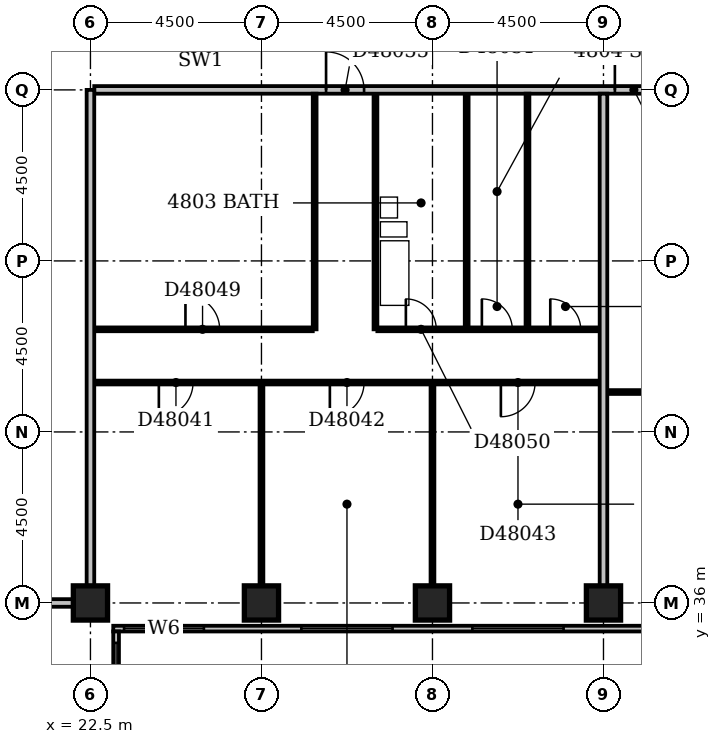
"""IFC4 building model, lengths in metres.
Left out: names, types, materials, properties, quantities, classifications, styles, units other than length and angle.
Written with IfcOpenShell. Run it as: python <this file> out.ifc"""

import sys

from ifc_helpers import new_model, si_unit, direction, frame, frame_2d, origin, origin_2d, place, context, subcontext, project, spatial, rectangle, extrude, element, fill, save


model = new_model("IFC4")
c1 = context("Model", 3, precision=1e-05, world=origin(), true_north=direction((0.0, 1.0)))
c2 = subcontext(c1, "Body", "Model", "MODEL_VIEW")
j1 = project(units=[si_unit("LENGTHUNIT", "METRE"), si_unit("PLANEANGLEUNIT", "RADIAN")], contexts=[c1])
p1 = place(None, origin())
s1 = spatial("IfcSite", under=j1, at=p1, CompositionType="ELEMENT")
p2 = place(p1, origin())
s2 = spatial("IfcBuilding", under=s1, at=p2, CompositionType="ELEMENT")
p3 = place(p2, frame((0.0, 0.0, 189.8)))
s3 = spatial("IfcBuildingStorey", under=s2, at=p3, CompositionType="ELEMENT", Elevation=189.8)
for number, where, z_axis, x_axis in (
    (1, (22.5, 36.0, -0.3), (0.0, 0.0, 1.0), (1.0, 0.0, 0.0)),
    (2, (27.0, 36.0, -0.3), (0.0, 0.0, 1.0), (1.0, 0.0, 0.0)),
    (3, (31.5, 36.0, -0.3), (0.0, 0.0, 1.0), (1.0, 0.0, 0.0)),
    (4, (36.0, 36.0, -0.3), (0.0, 0.0, 1.0), (1.0, 0.0, 0.0)),
):
    element("IfcColumn", number, at=place(p3, frame(where, z_axis=z_axis, x_axis=x_axis)), inside=s3, PredefinedType="COLUMN", context=c2, shape_type="SweptSolid", body=[
        extrude(rectangle(XDim=0.9, YDim=0.9, at=origin_2d()), origin(), (0.0, 0.0, 1.0), 3.6),
    ])
p4 = place(p3, frame((23.175, 17.4, 0.0), z_axis=(0.0, 0.0, 1.0), x_axis=(0.0, 1.0, 0.0)))
e5 = element("IfcWall", 5, at=p4, inside=s3, PredefinedType="STANDARD", context=c2, shape_type="SweptSolid", body=[
    extrude(rectangle(XDim=17.85, YDim=0.15, at=frame_2d((8.925, 0.0))), origin(), (0.0, 0.0, 1.0), 2.7),
])
p5 = place(p4, frame((1.35, 0.0, 0.6)))
e6 = element("IfcOpeningElement", 6, at=p5, cuts=e5, PredefinedType="OPENING", context=c2, shape_type="SweptSolid", body=[
    extrude(rectangle(XDim=2.1, YDim=1.8, at=frame_2d((1.05, 0.9))), frame((0.0, 0.087, 0.0), z_axis=(0.0, -1.0, 0.0), x_axis=(1.0, 0.0, 0.0)), (0.0, 0.0, 1.0), 0.174),
])
p6 = place(p4, frame((6.15, 0.0, 0.6)))
e7 = element("IfcOpeningElement", 7, at=p6, cuts=e5, PredefinedType="OPENING", context=c2, shape_type="SweptSolid", body=[
    extrude(rectangle(XDim=2.4, YDim=1.8, at=frame_2d((1.2, 0.9))), frame((0.0, 0.087, 0.0), z_axis=(0.0, -1.0, 0.0), x_axis=(1.0, 0.0, 0.0)), (0.0, 0.0, 1.0), 0.174),
])
p7 = place(p4, frame((10.65, 0.0, 0.6)))
e8 = element("IfcOpeningElement", 8, at=p7, cuts=e5, PredefinedType="OPENING", context=c2, shape_type="SweptSolid", body=[
    extrude(rectangle(XDim=2.4, YDim=1.8, at=frame_2d((1.2, 0.9))), frame((0.0, 0.087, 0.0), z_axis=(0.0, -1.0, 0.0), x_axis=(1.0, 0.0, 0.0)), (0.0, 0.0, 1.0), 0.174),
])
p8 = place(p4, frame((15.15, 0.0, 0.6)))
e9 = element("IfcOpeningElement", 9, at=p8, cuts=e5, PredefinedType="OPENING", context=c2, shape_type="SweptSolid", body=[
    extrude(rectangle(XDim=2.4, YDim=1.8, at=frame_2d((1.2, 0.9))), frame((0.0, 0.087, 0.0), z_axis=(0.0, -1.0, 0.0), x_axis=(1.0, 0.0, 0.0)), (0.0, 0.0, 1.0), 0.174),
])
p9 = place(p3, frame((23.1, 35.325, 0.0), z_axis=(0.0, 0.0, 1.0), x_axis=(1.0, 0.0, 0.0)))
e10 = element("IfcWall", 10, at=p9, inside=s3, PredefinedType="STANDARD", context=c2, shape_type="SweptSolid", body=[
    extrude(rectangle(XDim=27.15, YDim=0.15, at=frame_2d((13.575, 0.0))), origin(), (0.0, 0.0, 1.0), 2.7),
])
p10 = place(p9, frame((0.285, 0.0, 0.6)))
e11 = element("IfcOpeningElement", 11, at=p10, cuts=e10, PredefinedType="OPENING", context=c2, shape_type="SweptSolid", body=[
    extrude(rectangle(XDim=2.1, YDim=1.8, at=frame_2d((1.05, 0.9))), frame((0.0, 0.087, 0.0), z_axis=(0.0, -1.0, 0.0), x_axis=(1.0, 0.0, 0.0)), (0.0, 0.0, 1.0), 0.174),
])
p11 = place(p9, frame((4.95, 0.0, 0.6)))
e12 = element("IfcOpeningElement", 12, at=p11, cuts=e10, PredefinedType="OPENING", context=c2, shape_type="SweptSolid", body=[
    extrude(rectangle(XDim=2.4, YDim=1.8, at=frame_2d((1.2, 0.9))), frame((0.0, 0.087, 0.0), z_axis=(0.0, -1.0, 0.0), x_axis=(1.0, 0.0, 0.0)), (0.0, 0.0, 1.0), 0.174),
])
p12 = place(p9, frame((9.45, 0.0, 0.6)))
e13 = element("IfcOpeningElement", 13, at=p12, cuts=e10, PredefinedType="OPENING", context=c2, shape_type="SweptSolid", body=[
    extrude(rectangle(XDim=2.4, YDim=1.8, at=frame_2d((1.2, 0.9))), frame((0.0, 0.087, 0.0), z_axis=(0.0, -1.0, 0.0), x_axis=(1.0, 0.0, 0.0)), (0.0, 0.0, 1.0), 0.174),
])
p13 = place(p9, frame((13.95, 0.0, 0.6)))
e14 = element("IfcOpeningElement", 14, at=p13, cuts=e10, PredefinedType="OPENING", context=c2, shape_type="SweptSolid", body=[
    extrude(rectangle(XDim=2.4, YDim=1.8, at=frame_2d((1.2, 0.9))), frame((0.0, 0.087, 0.0), z_axis=(0.0, -1.0, 0.0), x_axis=(1.0, 0.0, 0.0)), (0.0, 0.0, 1.0), 0.174),
])
p14 = place(p9, frame((18.45, 0.0, 0.6)))
e15 = element("IfcOpeningElement", 15, at=p14, cuts=e10, PredefinedType="OPENING", context=c2, shape_type="SweptSolid", body=[
    extrude(rectangle(XDim=2.4, YDim=1.8, at=frame_2d((1.2, 0.9))), frame((0.0, 0.087, 0.0), z_axis=(0.0, -1.0, 0.0), x_axis=(1.0, 0.0, 0.0)), (0.0, 0.0, 1.0), 0.174),
])
p15 = place(p9, frame((24.179, 0.0, 0.6)))
e16 = element("IfcOpeningElement", 16, at=p15, cuts=e10, PredefinedType="OPENING", context=c2, shape_type="SweptSolid", body=[
    extrude(rectangle(XDim=1.5, YDim=1.8, at=frame_2d((0.75, 0.9))), frame((0.0, 0.087, 0.0), z_axis=(0.0, -1.0, 0.0), x_axis=(1.0, 0.0, 0.0)), (0.0, 0.0, 1.0), 0.174),
])
p16 = place(p3, frame((9.1, 36.0, 0.0), z_axis=(0.0, 0.0, 1.0), x_axis=(1.0, 0.0, 0.0)))
e17 = element("IfcWall", 17, at=p16, inside=s3, PredefinedType="PARTITIONING", context=c2, shape_type="SweptSolid", body=[
    extrude(rectangle(XDim=12.95, YDim=0.2, at=frame_2d((6.475, 0.0))), origin(), (0.0, 0.0, 1.0), 3.3),
])
p17 = place(p3, frame((22.5, 36.45, 0.0), z_axis=(0.0, 0.0, 1.0), x_axis=(0.0, 1.0, 0.0)))
e18 = element("IfcWall", 18, at=p17, inside=s3, PredefinedType="PARTITIONING", context=c2, shape_type="SweptSolid", body=[
    extrude(rectangle(XDim=13.05, YDim=0.2, at=frame_2d((6.525, 0.0))), origin(), (0.0, 0.0, 1.0), 3.3),
])
p18 = place(p3, frame((27.0, 36.45, 0.0), z_axis=(0.0, 0.0, 1.0), x_axis=(0.0, 1.0, 0.0)))
e19 = element("IfcWall", 19, at=p18, inside=s3, PredefinedType="PARTITIONING", context=c2, shape_type="SweptSolid", body=[
    extrude(rectangle(XDim=5.3, YDim=0.1, at=frame_2d((2.65, 0.0))), origin(), (0.0, 0.0, 1.0), 2.4),
])
p19 = place(p3, frame((31.5, 36.45, 0.0), z_axis=(0.0, 0.0, 1.0), x_axis=(0.0, 1.0, 0.0)))
e20 = element("IfcWall", 20, at=p19, inside=s3, PredefinedType="PARTITIONING", context=c2, shape_type="SweptSolid", body=[
    extrude(rectangle(XDim=5.3, YDim=0.1, at=frame_2d((2.65, 0.0))), origin(), (0.0, 0.0, 1.0), 3.3),
])
p20 = place(p3, frame((36.0, 36.45, 0.0), z_axis=(0.0, 0.0, 1.0), x_axis=(0.0, 1.0, 0.0)))
e21 = element("IfcWall", 21, at=p20, inside=s3, PredefinedType="PARTITIONING", context=c2, shape_type="SweptSolid", body=[
    extrude(rectangle(XDim=12.95, YDim=0.2, at=frame_2d((6.475, 0.0))), origin(), (0.0, 0.0, 1.0), 2.4),
])
p21 = place(p3, frame((36.1, 41.55, 0.0), z_axis=(0.0, 0.0, 1.0), x_axis=(1.0, 0.0, 0.0)))
e22 = element("IfcWall", 22, at=p21, inside=s3, PredefinedType="PARTITIONING", context=c2, shape_type="SweptSolid", body=[
    extrude(rectangle(XDim=13.3, YDim=0.1, at=frame_2d((6.65, 0.0))), origin(), (0.0, 0.0, 1.0), 3.3),
])
p22 = place(p21, frame((3.9, 0.0, 0.0)))
e23 = element("IfcOpeningElement", 23, at=p22, cuts=e22, PredefinedType="OPENING", context=c2, shape_type="SweptSolid", body=[
    extrude(rectangle(XDim=0.9, YDim=2.1, at=frame_2d((0.45, 1.05))), frame((0.0, 0.062, 0.0), z_axis=(0.0, -1.0, 0.0), x_axis=(1.0, 0.0, 0.0)), (0.0, 0.0, 1.0), 0.124),
])
p23 = place(p21, frame((10.7, 0.0, 0.0)))
e24 = element("IfcOpeningElement", 24, at=p23, cuts=e22, PredefinedType="OPENING", context=c2, shape_type="SweptSolid", body=[
    extrude(rectangle(XDim=0.9, YDim=2.1, at=frame_2d((0.45, 1.05))), frame((0.0, 0.062, 0.0), z_axis=(0.0, -1.0, 0.0), x_axis=(1.0, 0.0, 0.0)), (0.0, 0.0, 1.0), 0.124),
])
p24 = place(p3, frame((22.6, 41.8, 0.0), z_axis=(0.0, 0.0, 1.0), x_axis=(1.0, 0.0, 0.0)))
e25 = element("IfcWall", 25, at=p24, inside=s3, PredefinedType="PARTITIONING", context=c2, shape_type="SweptSolid", body=[
    extrude(rectangle(XDim=13.3, YDim=0.1, at=frame_2d((6.65, 0.0))), origin(), (0.0, 0.0, 1.0), 3.3),
])
p25 = place(p24, frame((1.7, 0.0, 0.0)))
e26 = element("IfcOpeningElement", 26, at=p25, cuts=e25, PredefinedType="OPENING", context=c2, shape_type="SweptSolid", body=[
    extrude(rectangle(XDim=0.9, YDim=2.1, at=frame_2d((0.45, 1.05))), frame((0.0, 0.062, 0.0), z_axis=(0.0, -1.0, 0.0), x_axis=(1.0, 0.0, 0.0)), (0.0, 0.0, 1.0), 0.124),
])
p26 = place(p24, frame((6.2, 0.0, 0.0)))
e27 = element("IfcOpeningElement", 27, at=p26, cuts=e25, PredefinedType="OPENING", context=c2, shape_type="SweptSolid", body=[
    extrude(rectangle(XDim=0.9, YDim=2.1, at=frame_2d((0.45, 1.05))), frame((0.0, 0.062, 0.0), z_axis=(0.0, -1.0, 0.0), x_axis=(1.0, 0.0, 0.0)), (0.0, 0.0, 1.0), 0.124),
])
p27 = place(p24, frame((10.7, 0.0, 0.0)))
e28 = element("IfcOpeningElement", 28, at=p27, cuts=e25, PredefinedType="OPENING", context=c2, shape_type="SweptSolid", body=[
    extrude(rectangle(XDim=0.9, YDim=2.1, at=frame_2d((0.45, 1.05))), frame((0.0, 0.062, 0.0), z_axis=(0.0, -1.0, 0.0), x_axis=(1.0, 0.0, 0.0)), (0.0, 0.0, 1.0), 0.124),
])
p28 = place(p3, frame((22.6, 43.2, 0.0), z_axis=(0.0, 0.0, 1.0), x_axis=(1.0, 0.0, 0.0)))
e29 = element("IfcWall", 29, at=p28, inside=s3, PredefinedType="PARTITIONING", context=c2, shape_type="SweptSolid", body=[
    extrude(rectangle(XDim=5.75, YDim=0.1, at=frame_2d((2.875, 0.0))), origin(), (0.0, 0.0, 1.0), 3.3),
])
p29 = place(p28, frame((2.4, 0.0, 0.0)))
e30 = element("IfcOpeningElement", 30, at=p29, cuts=e29, PredefinedType="OPENING", context=c2, shape_type="SweptSolid", body=[
    extrude(rectangle(XDim=0.9, YDim=2.1, at=frame_2d((0.45, 1.05))), frame((0.0, 0.062, 0.0), z_axis=(0.0, -1.0, 0.0), x_axis=(1.0, 0.0, 0.0)), (0.0, 0.0, 1.0), 0.124),
])
p30 = place(p3, frame((28.4, 43.2, 0.0), z_axis=(0.0, 0.0, 1.0), x_axis=(0.0, 1.0, 0.0)))
e31 = element("IfcWall", 31, at=p30, inside=s3, PredefinedType="PARTITIONING", context=c2, shape_type="SweptSolid", body=[
    extrude(rectangle(XDim=6.2, YDim=0.1, at=frame_2d((3.1, 0.0))), origin(), (0.0, 0.0, 1.0), 3.3),
])
p31 = place(p3, frame((30.0, 43.2, 0.0), z_axis=(0.0, 0.0, 1.0), x_axis=(0.0, 1.0, 0.0)))
e32 = element("IfcWall", 32, at=p31, inside=s3, PredefinedType="PLUMBINGWALL", context=c2, shape_type="SweptSolid", body=[
    extrude(rectangle(XDim=6.2, YDim=0.1, at=frame_2d((3.1, 0.0))), origin(), (0.0, 0.0, 1.0), 3.3),
])
p32 = place(p3, frame((30.05, 43.2, 0.0), z_axis=(0.0, 0.0, 1.0), x_axis=(1.0, 0.0, 0.0)))
e33 = element("IfcWall", 33, at=p32, inside=s3, PredefinedType="PARTITIONING", context=c2, shape_type="SweptSolid", body=[
    extrude(rectangle(XDim=5.85, YDim=0.1, at=frame_2d((2.925, 0.0))), origin(), (0.0, 0.0, 1.0), 3.3),
])
p33 = place(p32, frame((0.75, 0.0, 0.0)))
e34 = element("IfcOpeningElement", 34, at=p33, cuts=e33, PredefinedType="OPENING", context=c2, shape_type="SweptSolid", body=[
    extrude(rectangle(XDim=0.8, YDim=2.1, at=frame_2d((0.4, 1.05))), frame((0.0, 0.062, 0.0), z_axis=(0.0, -1.0, 0.0), x_axis=(1.0, 0.0, 0.0)), (0.0, 0.0, 1.0), 0.124),
])
p34 = place(p32, frame((2.75, 0.0, 0.0)))
e35 = element("IfcOpeningElement", 35, at=p34, cuts=e33, PredefinedType="OPENING", context=c2, shape_type="SweptSolid", body=[
    extrude(rectangle(XDim=0.8, YDim=2.1, at=frame_2d((0.4, 1.05))), frame((0.0, 0.062, 0.0), z_axis=(0.0, -1.0, 0.0), x_axis=(1.0, 0.0, 0.0)), (0.0, 0.0, 1.0), 0.124),
])
p35 = place(p32, frame((4.55, 0.0, 0.0)))
e36 = element("IfcOpeningElement", 36, at=p35, cuts=e33, PredefinedType="OPENING", context=c2, shape_type="SweptSolid", body=[
    extrude(rectangle(XDim=0.8, YDim=2.1, at=frame_2d((0.4, 1.05))), frame((0.0, 0.062, 0.0), z_axis=(0.0, -1.0, 0.0), x_axis=(1.0, 0.0, 0.0)), (0.0, 0.0, 1.0), 0.124),
])
p36 = place(p3, frame((32.4, 43.25, 0.0), z_axis=(0.0, 0.0, 1.0), x_axis=(0.0, 1.0, 0.0)))
e37 = element("IfcWall", 37, at=p36, inside=s3, PredefinedType="PLUMBINGWALL", context=c2, shape_type="SweptSolid", body=[
    extrude(rectangle(XDim=6.15, YDim=0.1, at=frame_2d((3.075, 0.0))), origin(), (0.0, 0.0, 1.0), 3.3),
])
p37 = place(p3, frame((34.0, 43.25, 0.0), z_axis=(0.0, 0.0, 1.0), x_axis=(0.0, 1.0, 0.0)))
e38 = element("IfcWall", 38, at=p37, inside=s3, PredefinedType="PARTITIONING", context=c2, shape_type="SweptSolid", body=[
    extrude(rectangle(XDim=6.15, YDim=0.1, at=frame_2d((3.075, 0.0))), origin(), (0.0, 0.0, 1.0), 3.3),
])
p38 = place(p3, frame((22.6, 49.5, 0.0), z_axis=(0.0, 0.0, 1.0), x_axis=(1.0, 0.0, 0.0)))
e39 = element("IfcWall", 39, at=p38, inside=s3, PredefinedType="PARTITIONING", context=c2, shape_type="SweptSolid", body=[
    extrude(rectangle(XDim=30.95, YDim=0.2, at=frame_2d((15.475, 0.0))), origin(), (0.0, 0.0, 1.0), 3.3),
])
p39 = place(p38, frame((6.1, 0.0, 0.0)))
e40 = element("IfcOpeningElement", 40, at=p39, cuts=e39, PredefinedType="OPENING", context=c2, shape_type="SweptSolid", body=[
    extrude(rectangle(XDim=1.0, YDim=2.1, at=frame_2d((0.5, 1.05))), frame((0.0, 0.112, 0.0), z_axis=(0.0, -1.0, 0.0), x_axis=(1.0, 0.0, 0.0)), (0.0, 0.0, 1.0), 0.224),
])
p40 = place(p38, frame((13.7, 0.0, 0.0)))
e41 = element("IfcOpeningElement", 41, at=p40, cuts=e39, PredefinedType="OPENING", context=c2, shape_type="SweptSolid", body=[
    extrude(rectangle(XDim=1.0, YDim=2.1, at=frame_2d((0.5, 1.05))), frame((0.0, 0.112, 0.0), z_axis=(0.0, -1.0, 0.0), x_axis=(1.0, 0.0, 0.0)), (0.0, 0.0, 1.0), 0.224),
])
p41 = place(p38, frame((27.15, 0.0, 0.0)))
e42 = element("IfcOpeningElement", 42, at=p41, cuts=e39, PredefinedType="OPENING", context=c2, shape_type="SweptSolid", body=[
    extrude(rectangle(XDim=1.0, YDim=2.1, at=frame_2d((0.5, 1.05))), frame((0.0, 0.112, 0.0), z_axis=(0.0, -1.0, 0.0), x_axis=(1.0, 0.0, 0.0)), (0.0, 0.0, 1.0), 0.224),
])
p42 = place(p8, origin())
e43 = element("IfcWindow", 43, at=p42, inside=s3, PartitioningType="SINGLE_PANEL", PredefinedType="WINDOW", context=c2, shape_type="SweptSolid", body=[
    extrude(rectangle(XDim=2.4, YDim=1.8, at=frame_2d((1.2, 0.9))), frame((0.0, 0.03, 0.0), z_axis=(0.0, -1.0, 0.0), x_axis=(1.0, 0.0, 0.0)), (0.0, 0.0, 1.0), 0.06),
])
fill(e9, e43)
p43 = place(p10, origin())
e44 = element("IfcWindow", 44, at=p43, inside=s3, PartitioningType="SINGLE_PANEL", PredefinedType="WINDOW", context=c2, shape_type="SweptSolid", body=[
    extrude(rectangle(XDim=2.1, YDim=1.8, at=frame_2d((1.05, 0.9))), frame((0.0, 0.03, 0.0), z_axis=(0.0, -1.0, 0.0), x_axis=(1.0, 0.0, 0.0)), (0.0, 0.0, 1.0), 0.06),
])
fill(e11, e44)
p44 = place(p11, origin())
e45 = element("IfcWindow", 45, at=p44, inside=s3, PartitioningType="SINGLE_PANEL", PredefinedType="WINDOW", context=c2, shape_type="SweptSolid", body=[
    extrude(rectangle(XDim=2.4, YDim=1.8, at=frame_2d((1.2, 0.9))), frame((0.0, 0.03, 0.0), z_axis=(0.0, -1.0, 0.0), x_axis=(1.0, 0.0, 0.0)), (0.0, 0.0, 1.0), 0.06),
])
fill(e12, e45)
p45 = place(p12, origin())
e46 = element("IfcWindow", 46, at=p45, inside=s3, PartitioningType="SINGLE_PANEL", PredefinedType="WINDOW", context=c2, shape_type="SweptSolid", body=[
    extrude(rectangle(XDim=2.4, YDim=1.8, at=frame_2d((1.2, 0.9))), frame((0.0, 0.03, 0.0), z_axis=(0.0, -1.0, 0.0), x_axis=(1.0, 0.0, 0.0)), (0.0, 0.0, 1.0), 0.06),
])
fill(e13, e46)
p46 = place(p25, frame((0.9, 0.0, 0.0), z_axis=(0.0, 0.0, 1.0), x_axis=(-1.0, 0.0, 0.0)))
e47 = element("IfcDoor", 47, at=p46, inside=s3, OperationType="SINGLE_SWING_RIGHT", PredefinedType="DOOR", context=c2, shape_type="SweptSolid", body=[
    extrude(rectangle(XDim=0.9, YDim=2.1, at=frame_2d((0.45, 1.05))), frame((0.0, 0.025, 0.0), z_axis=(0.0, -1.0, 0.0), x_axis=(1.0, 0.0, 0.0)), (0.0, 0.0, 1.0), 0.05),
])
fill(e26, e47)
p47 = place(p26, frame((0.9, 0.0, 0.0), z_axis=(0.0, 0.0, 1.0), x_axis=(-1.0, 0.0, 0.0)))
e48 = element("IfcDoor", 48, at=p47, inside=s3, OperationType="SINGLE_SWING_RIGHT", PredefinedType="DOOR", context=c2, shape_type="SweptSolid", body=[
    extrude(rectangle(XDim=0.9, YDim=2.1, at=frame_2d((0.45, 1.05))), frame((0.0, 0.025, 0.0), z_axis=(0.0, -1.0, 0.0), x_axis=(1.0, 0.0, 0.0)), (0.0, 0.0, 1.0), 0.05),
])
fill(e27, e48)
p48 = place(p27, frame((0.9, 0.0, 0.0), z_axis=(0.0, 0.0, 1.0), x_axis=(-1.0, 0.0, 0.0)))
e49 = element("IfcDoor", 49, at=p48, inside=s3, OperationType="SINGLE_SWING_RIGHT", PredefinedType="DOOR", context=c2, shape_type="SweptSolid", body=[
    extrude(rectangle(XDim=0.9, YDim=2.1, at=frame_2d((0.45, 1.05))), frame((0.0, 0.025, 0.0), z_axis=(0.0, -1.0, 0.0), x_axis=(1.0, 0.0, 0.0)), (0.0, 0.0, 1.0), 0.05),
])
fill(e28, e49)
p49 = place(p29, origin())
e50 = element("IfcDoor", 50, at=p49, inside=s3, OperationType="SINGLE_SWING_LEFT", PredefinedType="DOOR", context=c2, shape_type="SweptSolid", body=[
    extrude(rectangle(XDim=0.9, YDim=2.1, at=frame_2d((0.45, 1.05))), frame((0.0, 0.025, 0.0), z_axis=(0.0, -1.0, 0.0), x_axis=(1.0, 0.0, 0.0)), (0.0, 0.0, 1.0), 0.05),
])
fill(e30, e50)
p50 = place(p33, origin())
e51 = element("IfcDoor", 51, at=p50, inside=s3, OperationType="SINGLE_SWING_LEFT", PredefinedType="DOOR", context=c2, shape_type="SweptSolid", body=[
    extrude(rectangle(XDim=0.8, YDim=2.1, at=frame_2d((0.4, 1.05))), frame((0.0, 0.025, 0.0), z_axis=(0.0, -1.0, 0.0), x_axis=(1.0, 0.0, 0.0)), (0.0, 0.0, 1.0), 0.05),
])
fill(e34, e51)
p51 = place(p34, origin())
e52 = element("IfcDoor", 52, at=p51, inside=s3, OperationType="SINGLE_SWING_LEFT", PredefinedType="DOOR", context=c2, shape_type="SweptSolid", body=[
    extrude(rectangle(XDim=0.8, YDim=2.1, at=frame_2d((0.4, 1.05))), frame((0.0, 0.025, 0.0), z_axis=(0.0, -1.0, 0.0), x_axis=(1.0, 0.0, 0.0)), (0.0, 0.0, 1.0), 0.05),
])
fill(e35, e52)
p52 = place(p35, origin())
e53 = element("IfcDoor", 53, at=p52, inside=s3, OperationType="SINGLE_SWING_LEFT", PredefinedType="DOOR", context=c2, shape_type="SweptSolid", body=[
    extrude(rectangle(XDim=0.8, YDim=2.1, at=frame_2d((0.4, 1.05))), frame((0.0, 0.025, 0.0), z_axis=(0.0, -1.0, 0.0), x_axis=(1.0, 0.0, 0.0)), (0.0, 0.0, 1.0), 0.05),
])
fill(e36, e53)
p53 = place(p39, origin())
e54 = element("IfcDoor", 54, at=p53, inside=s3, OperationType="SINGLE_SWING_LEFT", PredefinedType="DOOR", context=c2, shape_type="SweptSolid", body=[
    extrude(rectangle(XDim=1.0, YDim=2.1, at=frame_2d((0.5, 1.05))), frame((0.0, 0.025, 0.0), z_axis=(0.0, -1.0, 0.0), x_axis=(1.0, 0.0, 0.0)), (0.0, 0.0, 1.0), 0.05),
])
fill(e40, e54)
p54 = place(p40, origin())
e55 = element("IfcDoor", 55, at=p54, inside=s3, OperationType="SINGLE_SWING_LEFT", PredefinedType="DOOR", context=c2, shape_type="SweptSolid", body=[
    extrude(rectangle(XDim=1.0, YDim=2.1, at=frame_2d((0.5, 1.05))), frame((0.0, 0.025, 0.0), z_axis=(0.0, -1.0, 0.0), x_axis=(1.0, 0.0, 0.0)), (0.0, 0.0, 1.0), 0.05),
])
fill(e41, e55)
save(model, sys.argv[1])
